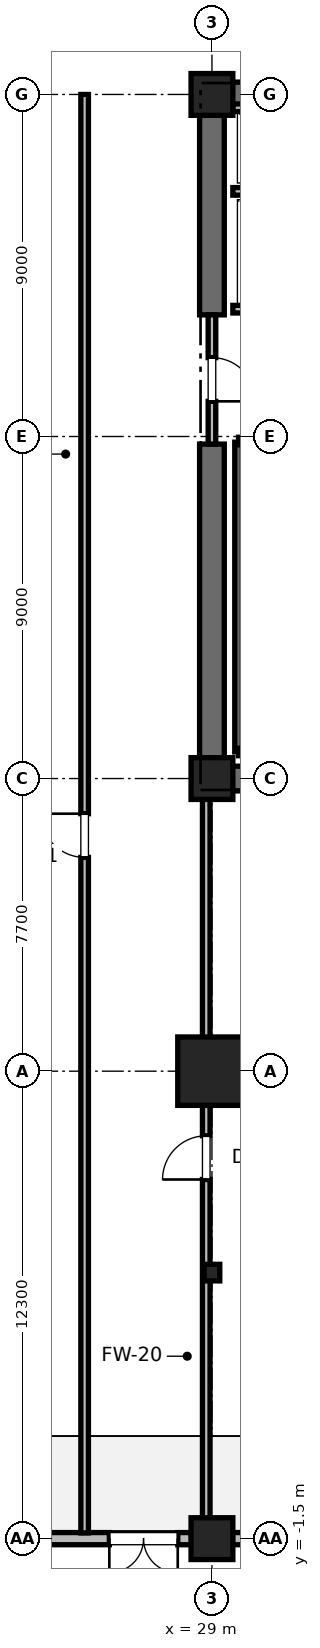
"""IFC4 building model, lengths in metres.
Left out: names, types, materials, properties, quantities, classifications, styles, units other than length and angle.
Written with IfcOpenShell. Run it as: python <this file> out.ifc"""

import sys

from ifc_helpers import new_model, si_unit, direction, frame, frame_2d, origin, origin_2d, place, context, subcontext, project, spatial, rectangle, i_section, extrude, element, fill, save


model = new_model("IFC4")
c1 = context("Model", 3, precision=1e-05, world=origin(), true_north=direction((0.0, 1.0)))
c2 = subcontext(c1, "Body", "Model", "MODEL_VIEW")
j1 = project(units=[si_unit("LENGTHUNIT", "METRE"), si_unit("PLANEANGLEUNIT", "RADIAN")], contexts=[c1])
p1 = place(None, origin())
s1 = spatial("IfcSite", under=j1, at=p1, CompositionType="ELEMENT")
p2 = place(p1, origin())
s2 = spatial("IfcBuilding", under=s1, at=p2, CompositionType="ELEMENT")
p3 = place(p2, origin())
s3 = spatial("IfcBuildingStorey", under=s2, at=p3, CompositionType="ELEMENT", Elevation=0.0)
p4 = place(p3, frame((29.0, 10.8, 0.0), z_axis=(0.0, 0.0, 1.0), x_axis=(1.0, 0.0, 0.0)))
e1 = element("IfcColumn", 1, at=p4, inside=s3, PredefinedType="COLUMN", context=c2, shape_type="SweptSolid", body=[
    extrude(rectangle(XDim=1.8, YDim=1.8, at=origin_2d()), origin(), (0.0, 0.0, 1.0), 6.0),
])
p5 = place(p3, frame((29.0, 5.5, 0.0), z_axis=(0.0, 0.0, 1.0), x_axis=(1.0, 0.0, 0.0)))
e2 = element("IfcColumn", 2, at=p5, inside=s3, PredefinedType="COLUMN", context=c2, shape_type="SweptSolid", body=[
    extrude(i_section(OverallWidth=0.412, OverallDepth=0.437, WebThickness=0.036, FlangeThickness=0.058, FilletRadius=0.015, at=origin_2d()), origin(), (0.0, 0.0, 1.0), 6.0),
])
for number, where, z_axis, x_axis in (
    (3, (29.0, 18.5, 0.0), (0.0, 0.0, 1.0), (1.0, 0.0, 0.0)),
    (4, (29.0, 36.5, 0.0), (0.0, 0.0, 1.0), (1.0, 0.0, 0.0)),
):
    element("IfcColumn", number, at=place(p3, frame(where, z_axis=z_axis, x_axis=x_axis)), inside=s3, PredefinedType="PILASTER", context=c2, shape_type="SweptSolid", body=[
        extrude(rectangle(XDim=1.1, YDim=1.1, at=origin_2d()), origin(), (0.0, 0.0, 1.0), 6.0),
    ])
p6 = place(p3, frame((29.0, -1.5, 0.0), z_axis=(0.0, 0.0, 1.0), x_axis=(1.0, 0.0, 0.0)))
e5 = element("IfcColumn", 5, at=p6, inside=s3, PredefinedType="COLUMN", context=c2, shape_type="SweptSolid", body=[
    extrude(rectangle(XDim=1.1, YDim=1.1, at=origin_2d()), origin(), (0.0, 0.0, 1.0), 6.0),
])
p7 = place(p3, frame((29.0, 18.5, 0.0), z_axis=(0.0, 0.0, 1.0), x_axis=(1.0, 0.0, 0.0)))
e6 = element("IfcWall", 6, at=p7, inside=s3, PredefinedType="SHEAR", context=c2, shape_type="SweptSolid", body=[
    extrude(rectangle(XDim=9.2, YDim=0.65, at=frame_2d((4.6, 0.0))), origin(), (0.0, 0.0, 1.0), 5.72),
])
p8 = place(p3, frame((29.0, 36.5, 0.0), z_axis=(0.0, 0.0, 1.0), x_axis=(1.0, 0.0, 0.0)))
e7 = element("IfcWall", 7, at=p8, inside=s3, PredefinedType="SHEAR", context=c2, shape_type="SweptSolid", body=[
    extrude(rectangle(XDim=5.8, YDim=0.65, at=frame_2d((2.9, 0.0))), origin(), (0.0, 0.0, 1.0), 5.72),
])
p9 = place(p3, frame((29.0, 18.5, 0.0), z_axis=(0.0, 0.0, 1.0), x_axis=(0.0, 1.0, 0.0)))
e8 = element("IfcWall", 8, at=p9, inside=s3, PredefinedType="SHEAR", context=c2, shape_type="SweptSolid", body=[
    extrude(rectangle(XDim=8.8, YDim=0.65, at=frame_2d((4.4, 0.0))), origin(), (0.0, 0.0, 1.0), 5.72),
])
p10 = place(p3, frame((29.0, 30.7, 0.0), z_axis=(0.0, 0.0, 1.0), x_axis=(0.0, 1.0, 0.0)))
e9 = element("IfcWall", 9, at=p10, inside=s3, PredefinedType="SHEAR", context=c2, shape_type="SweptSolid", body=[
    extrude(rectangle(XDim=5.8, YDim=0.65, at=frame_2d((2.9, 0.0))), origin(), (0.0, 0.0, 1.0), 5.72),
])
p11 = place(p3, frame((28.46, -1.5, 0.0), z_axis=(0.0, 0.0, 1.0), x_axis=(-1.0, 0.0, 0.0)))
e10 = element("IfcWall", 10, at=p11, inside=s3, PredefinedType="SOLIDWALL", context=c2, shape_type="SweptSolid", body=[
    extrude(rectangle(XDim=6.32, YDim=0.32, at=frame_2d((3.16, 0.0))), origin(), (0.0, 0.0, 1.0), 4.33),
])
p12 = place(p11, frame((0.36, 0.0, 0.0)))
e11 = element("IfcOpeningElement", 11, at=p12, cuts=e10, PredefinedType="OPENING", context=c2, shape_type="SweptSolid", body=[
    extrude(rectangle(XDim=1.8, YDim=2.4, at=frame_2d((0.9, 1.2))), frame((0.0, 0.16, 0.0), z_axis=(0.0, -1.0, 0.0), x_axis=(1.0, 0.0, 0.0)), (0.0, 0.0, 1.0), 0.32),
])
p13 = place(p3, frame((29.54, -1.5, 0.0), z_axis=(0.0, 0.0, 1.0), x_axis=(1.0, 0.0, 0.0)))
e12 = element("IfcWall", 12, at=p13, inside=s3, PredefinedType="SOLIDWALL", context=c2, shape_type="SweptSolid", body=[
    extrude(rectangle(XDim=20.92, YDim=0.32, at=frame_2d((10.46, 0.0))), origin(), (0.0, 0.0, 1.0), 4.33),
])
p14 = place(p13, frame((3.38, 0.0, 0.0)))
e13 = element("IfcOpeningElement", 13, at=p14, cuts=e12, PredefinedType="OPENING", context=c2, shape_type="SweptSolid", body=[
    extrude(rectangle(XDim=2.4, YDim=2.8, at=frame_2d((1.2, 1.4))), frame((0.0, 0.16, 0.0), z_axis=(0.0, -1.0, 0.0), x_axis=(1.0, 0.0, 0.0)), (0.0, 0.0, 1.0), 0.32),
])
p15 = place(p13, frame((9.28, 0.0, 0.9)))
e14 = element("IfcOpeningElement", 14, at=p15, cuts=e12, PredefinedType="OPENING", context=c2, shape_type="SweptSolid", body=[
    extrude(rectangle(XDim=2.4, YDim=2.4, at=frame_2d((1.2, 1.2))), frame((0.0, 0.16, 0.0), z_axis=(0.0, -1.0, 0.0), x_axis=(1.0, 0.0, 0.0)), (0.0, 0.0, 1.0), 0.32),
])
p16 = place(p13, frame((15.18, 0.0, 0.0)))
e15 = element("IfcOpeningElement", 15, at=p16, cuts=e12, PredefinedType="OPENING", context=c2, shape_type="SweptSolid", body=[
    extrude(rectangle(XDim=2.4, YDim=2.8, at=frame_2d((1.2, 1.4))), frame((0.0, 0.16, 0.0), z_axis=(0.0, -1.0, 0.0), x_axis=(1.0, 0.0, 0.0)), (0.0, 0.0, 1.0), 0.32),
])
p17 = place(p3, frame((29.7, 19.2, 0.0), z_axis=(0.0, 0.0, 1.0), x_axis=(0.0, 1.0, 0.0)))
e16 = element("IfcWall", 16, at=p17, inside=s3, PredefinedType="SOLIDWALL", context=c2, shape_type="SweptSolid", body=[
    extrude(rectangle(XDim=8.15, YDim=0.2, at=frame_2d((4.075, 0.0))), origin(), (0.0, 0.0, 1.0), 5.72),
])
p18 = place(p3, frame((29.7, 19.2, 0.0), z_axis=(0.0, 0.0, 1.0), x_axis=(1.0, 0.0, 0.0)))
e17 = element("IfcWall", 17, at=p18, inside=s3, PredefinedType="SOLIDWALL", context=c2, shape_type="SweptSolid", body=[
    extrude(rectangle(XDim=3.12, YDim=0.2, at=frame_2d((1.56, 0.0))), origin(), (0.0, 0.0, 1.0), 5.72),
])
p19 = place(p3, frame((29.7, 27.38, 0.0), z_axis=(0.0, 0.0, 1.0), x_axis=(1.0, 0.0, 0.0)))
e18 = element("IfcWall", 18, at=p19, inside=s3, PredefinedType="SOLIDWALL", context=c2, shape_type="SweptSolid", body=[
    extrude(rectangle(XDim=3.12, YDim=0.2, at=frame_2d((1.56, 0.0))), origin(), (0.0, 0.0, 1.0), 5.72),
])
p20 = place(p19, frame((1.01, 0.0, 0.0)))
e19 = element("IfcOpeningElement", 19, at=p20, cuts=e18, PredefinedType="OPENING", context=c2, shape_type="SweptSolid", body=[
    extrude(rectangle(XDim=1.1, YDim=2.15, at=frame_2d((0.55, 1.075))), frame((0.0, 0.1, 0.0), z_axis=(0.0, -1.0, 0.0), x_axis=(1.0, 0.0, 0.0)), (0.0, 0.0, 1.0), 0.2),
])
p21 = place(p3, frame((29.0, 30.7, 0.0), z_axis=(0.0, 0.0, 1.0), x_axis=(0.0, -1.0, 0.0)))
e20 = element("IfcWall", 20, at=p21, inside=s3, PredefinedType="PARTITIONING", context=c2, shape_type="SweptSolid", body=[
    extrude(rectangle(XDim=3.4, YDim=0.2, at=frame_2d((1.7, 0.0))), origin(), (0.0, 0.0, 1.0), 4.5),
])
p22 = place(p21, frame((1.125, 0.0, 0.0)))
e21 = element("IfcOpeningElement", 21, at=p22, cuts=e20, PredefinedType="OPENING", context=c2, shape_type="SweptSolid", body=[
    extrude(rectangle(XDim=1.15, YDim=2.2, at=frame_2d((0.575, 1.1))), frame((0.0, 0.1, 0.0), z_axis=(0.0, -1.0, 0.0), x_axis=(1.0, 0.0, 0.0)), (0.0, 0.0, 1.0), 0.2),
])
p23 = place(p3, frame((29.55, 30.85, 0.0), z_axis=(0.0, 0.0, 1.0), x_axis=(1.0, 0.0, 0.0)))
e22 = element("IfcWall", 22, at=p23, inside=s3, PredefinedType="SOLIDWALL", context=c2, shape_type="SweptSolid", body=[
    extrude(rectangle(XDim=2.6, YDim=0.2, at=frame_2d((1.3, 0.0))), origin(), (0.0, 0.0, 1.0), 4.5),
])
p24 = place(p23, frame((0.75, 0.0, 0.0)))
e23 = element("IfcOpeningElement", 23, at=p24, cuts=e22, PredefinedType="OPENING", context=c2, shape_type="SweptSolid", body=[
    extrude(rectangle(XDim=1.1, YDim=2.2, at=frame_2d((0.55, 1.1))), frame((0.0, 0.1, 0.0), z_axis=(0.0, -1.0, 0.0), x_axis=(1.0, 0.0, 0.0)), (0.0, 0.0, 1.0), 0.2),
])
p25 = place(p3, frame((29.55, 33.95, 0.0), z_axis=(0.0, 0.0, 1.0), x_axis=(1.0, 0.0, 0.0)))
e24 = element("IfcWall", 24, at=p25, inside=s3, PredefinedType="SOLIDWALL", context=c2, shape_type="SweptSolid", body=[
    extrude(rectangle(XDim=2.8, YDim=0.2, at=frame_2d((1.4, 0.0))), origin(), (0.0, 0.0, 1.0), 5.72),
])
p26 = place(p3, frame((32.35, 36.15, 0.0), z_axis=(0.0, 0.0, 1.0), x_axis=(-1.0, 0.0, 0.0)))
e25 = element("IfcWall", 25, at=p26, inside=s3, PredefinedType="SOLIDWALL", context=c2, shape_type="SweptSolid", body=[
    extrude(rectangle(XDim=2.8, YDim=0.2, at=frame_2d((1.4, 0.0))), origin(), (0.0, 0.0, 1.0), 4.779),
])
p27 = place(p3, frame((28.85, -1.35, 0.0), z_axis=(0.0, 0.0, 1.0), x_axis=(0.0, 1.0, 0.0)))
e26 = element("IfcWall", 26, at=p27, inside=s3, PredefinedType="PARTITIONING", context=c2, shape_type="SweptSolid", body=[
    extrude(rectangle(XDim=19.75, YDim=0.2, at=frame_2d((9.875, 0.0))), origin(), (0.0, 0.0, 1.0), 2.85),
])
p28 = place(p27, frame((9.3, 0.0, 0.0)))
e27 = element("IfcOpeningElement", 27, at=p28, cuts=e26, PredefinedType="OPENING", context=c2, shape_type="SweptSolid", body=[
    extrude(rectangle(XDim=1.15, YDim=2.2, at=frame_2d((0.575, 1.1))), frame((0.0, 0.1, 0.0), z_axis=(0.0, -1.0, 0.0), x_axis=(1.0, 0.0, 0.0)), (0.0, 0.0, 1.0), 0.2),
])
p29 = place(p3, frame((25.65, -1.35, 0.0), z_axis=(0.0, 0.0, 1.0), x_axis=(0.0, 1.0, 0.0)))
e28 = element("IfcWall", 28, at=p29, inside=s3, PredefinedType="PARTITIONING", context=c2, shape_type="SweptSolid", body=[
    extrude(rectangle(XDim=37.85, YDim=0.2, at=frame_2d((18.925, 0.0))), origin(), (0.0, 0.0, 1.0), 2.85),
])
p30 = place(p29, frame((17.775, 0.0, 0.0)))
e29 = element("IfcOpeningElement", 29, at=p30, cuts=e28, PredefinedType="OPENING", context=c2, shape_type="SweptSolid", body=[
    extrude(rectangle(XDim=1.15, YDim=2.2, at=frame_2d((0.575, 1.1))), frame((0.0, 0.1, 0.0), z_axis=(0.0, -1.0, 0.0), x_axis=(1.0, 0.0, 0.0)), (0.0, 0.0, 1.0), 0.2),
])
p31 = place(p12, origin())
e30 = element("IfcDoor", 30, at=p31, inside=s3, OperationType="DOUBLE_DOOR_SINGLE_SWING", PredefinedType="DOOR", context=c2, shape_type="SweptSolid", body=[
    extrude(rectangle(XDim=1.8, YDim=2.4, at=frame_2d((0.9, 1.2))), frame((0.0, 0.025, 0.0), z_axis=(0.0, -1.0, 0.0), x_axis=(1.0, 0.0, 0.0)), (0.0, 0.0, 1.0), 0.05),
])
fill(e11, e30)
p32 = place(p22, origin())
e31 = element("IfcDoor", 31, at=p32, inside=s3, OperationType="SINGLE_SWING_RIGHT", PredefinedType="DOOR", context=c2, shape_type="SweptSolid", body=[
    extrude(rectangle(XDim=1.15, YDim=2.2, at=frame_2d((0.575, 1.1))), frame((0.0, 0.025, 0.0), z_axis=(0.0, -1.0, 0.0), x_axis=(1.0, 0.0, 0.0)), (0.0, 0.0, 1.0), 0.05),
])
fill(e21, e31)
p33 = place(p28, origin())
e32 = element("IfcDoor", 32, at=p33, inside=s3, OperationType="SINGLE_SWING_LEFT", PredefinedType="DOOR", context=c2, shape_type="SweptSolid", body=[
    extrude(rectangle(XDim=1.15, YDim=2.2, at=frame_2d((0.575, 1.1))), frame((0.0, 0.025, 0.0), z_axis=(0.0, -1.0, 0.0), x_axis=(1.0, 0.0, 0.0)), (0.0, 0.0, 1.0), 0.05),
])
fill(e27, e32)
p34 = place(p30, origin())
e33 = element("IfcDoor", 33, at=p34, inside=s3, OperationType="SINGLE_SWING_RIGHT", PredefinedType="DOOR", context=c2, shape_type="SweptSolid", body=[
    extrude(rectangle(XDim=1.15, YDim=2.2, at=frame_2d((0.575, 1.1))), frame((0.0, 0.025, 0.0), z_axis=(0.0, -1.0, 0.0), x_axis=(1.0, 0.0, 0.0)), (0.0, 0.0, 1.0), 0.05),
])
fill(e29, e33)
save(model, sys.argv[1])
